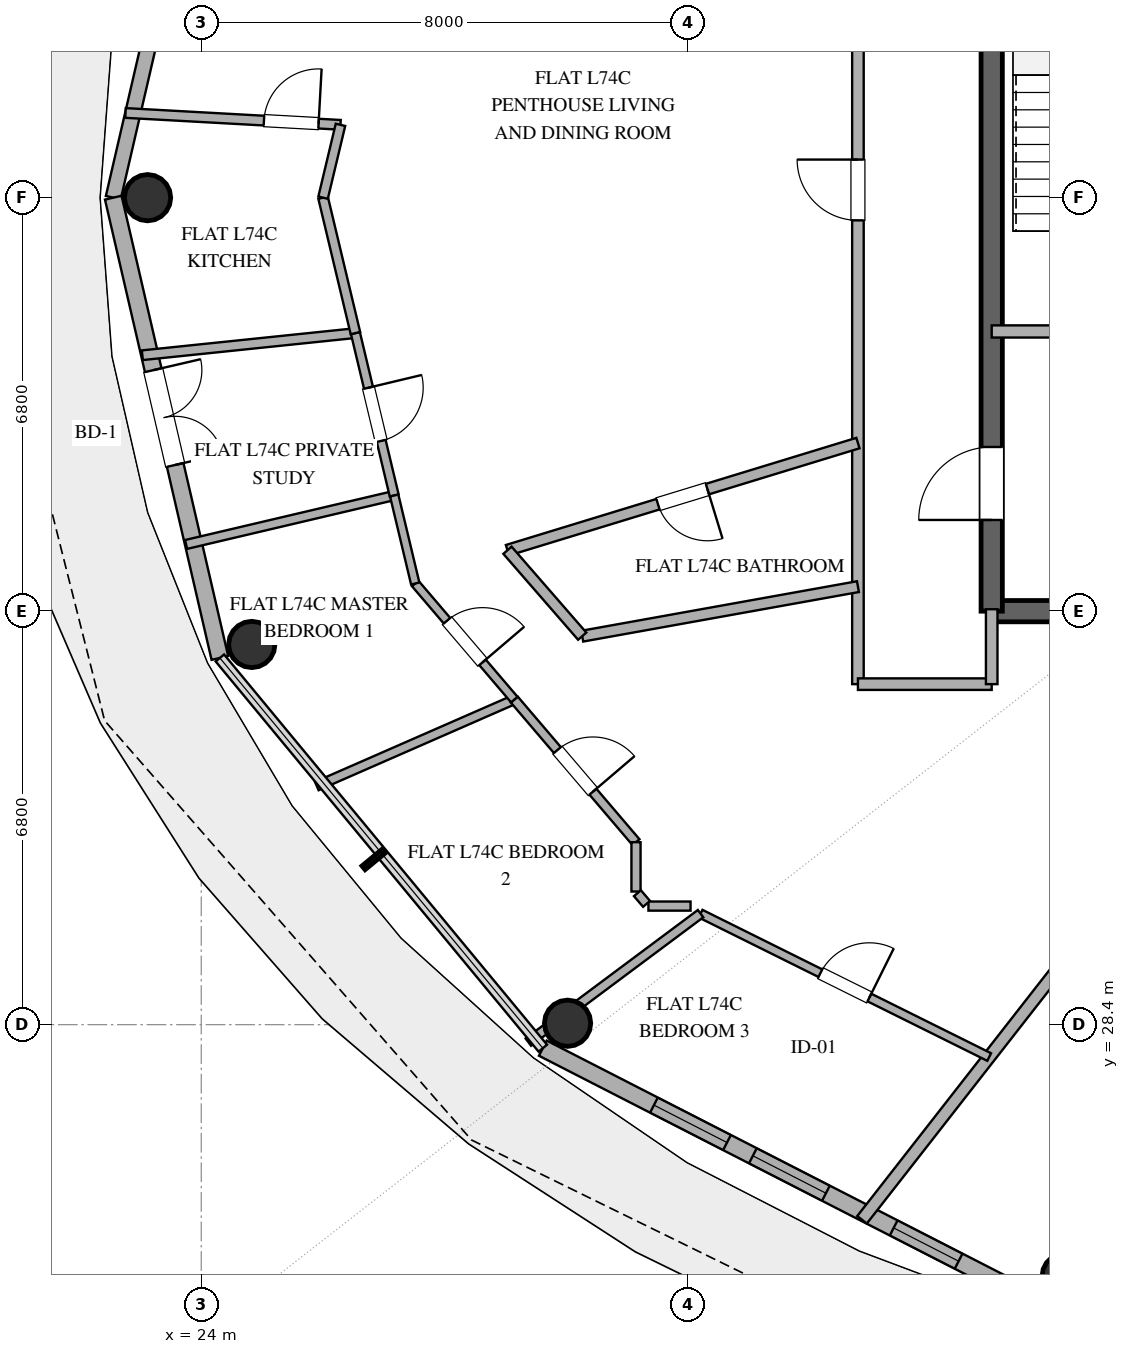
"""IFC4 building model, lengths in metres.
Left out: names, types, materials, properties, quantities, classifications, styles, units other than length and angle.
Written with IfcOpenShell. Run it as: python <this file> out.ifc"""

import sys

from ifc_helpers import new_model, si_unit, direction, frame, frame_2d, origin, origin_2d, place, context, subcontext, project, spatial, rectangle, hollow_circle, extrude, element, fill, save


model = new_model("IFC4")
c1 = context("Model", 3, precision=1e-05, world=origin(), true_north=direction((0.0, 1.0)))
c2 = subcontext(c1, "Body", "Model", "MODEL_VIEW")
j1 = project(units=[si_unit("LENGTHUNIT", "METRE"), si_unit("PLANEANGLEUNIT", "RADIAN")], contexts=[c1])
p1 = place(None, origin())
s1 = spatial("IfcSite", under=j1, at=p1, CompositionType="ELEMENT")
p2 = place(p1, origin())
s2 = spatial("IfcBuilding", under=s1, at=p2, CompositionType="ELEMENT")
p3 = place(p2, frame((0.0, 0.0, 287.4)))
s3 = spatial("IfcBuildingStorey", under=s2, at=p3, CompositionType="ELEMENT", Elevation=287.4)
p4 = place(p3, frame((37.0, 35.2, 0.0), z_axis=(0.0, 0.0, 1.0), x_axis=(1.0, 0.0, 0.0)))
e1 = element("IfcWall", 1, at=p4, inside=s3, PredefinedType="SHEAR", context=c2, shape_type="SweptSolid", body=[
    extrude(rectangle(XDim=4.0, YDim=0.35, at=frame_2d((2.0, 0.0))), origin(), (0.0, 0.0, 1.0), 3.37),
])
p5 = place(p3, frame((37.0, 35.2, 0.0), z_axis=(0.0, 0.0, 1.0), x_axis=(0.0, 1.0, 0.0)))
e2 = element("IfcWall", 2, at=p5, inside=s3, PredefinedType="SHEAR", context=c2, shape_type="SweptSolid", body=[
    extrude(rectangle(XDim=13.6, YDim=0.35, at=frame_2d((6.8, 0.0))), origin(), (0.0, 0.0, 1.0), 3.37),
])
p6 = place(p5, frame((1.5, 0.0, 0.0)))
e3 = element("IfcOpeningElement", 3, at=p6, cuts=e2, PredefinedType="OPENING", context=c2, shape_type="SweptSolid", body=[
    extrude(rectangle(XDim=1.2, YDim=2.15, at=frame_2d((0.6, 1.075))), frame((0.0, 0.185, 0.0), z_axis=(0.0, -1.0, 0.0), x_axis=(1.0, 0.0, 0.0)), (0.0, 0.0, 1.0), 0.37),
])
for number, where, z_axis, x_axis in (
    (4, (23.117, 42.0, 0.0), (0.0, 0.0, 1.0), (1.0, 0.0, 0.0)),
    (5, (24.831, 34.653, 0.0), (0.0, 0.0, 1.0), (1.0, 0.0, 0.0)),
    (6, (30.025, 28.424, 0.0), (0.0, 0.0, 1.0), (1.0, 0.0, 0.0)),
    (7, (38.209, 24.261, 0.0), (0.0, 0.0, 1.0), (1.0, 0.0, 0.0)),
):
    element("IfcColumn", number, at=place(p3, frame(where, z_axis=z_axis, x_axis=x_axis)), inside=s3, PredefinedType="COLUMN", context=c2, shape_type="SweptSolid", body=[
        extrude(hollow_circle(Radius=0.381, WallThickness=0.025, at=origin_2d()), origin(), (0.0, 0.0, 1.0), 3.37),
    ])
p7 = place(p3, frame((24.306, 49.57, 0.0), z_axis=(0.0, 0.0, 1.0), x_axis=(-0.225635078214, -0.974211892495, 0.0)))
e8 = element("IfcWall", 8, at=p7, inside=s3, PredefinedType="SOLIDWALL", context=c2, shape_type="SweptSolid", body=[
    extrude(rectangle(XDim=7.77, YDim=0.25, at=frame_2d((3.885, 0.0))), origin(), (0.0, 0.0, 1.0), 3.37),
])
p8 = place(p7, frame((0.878, 0.0, 1.42)))
e9 = element("IfcOpeningElement", 9, at=p8, cuts=e8, PredefinedType="OPENING", context=c2, shape_type="SweptSolid", body=[
    extrude(rectangle(XDim=1.0, YDim=1.05, at=frame_2d((0.5, 0.525))), frame((0.0, 0.135, 0.0), z_axis=(0.0, -1.0, 0.0), x_axis=(1.0, 0.0, 0.0)), (0.0, 0.0, 1.0), 0.27),
])
p9 = place(p3, frame((22.553, 42.0, 0.0), z_axis=(0.0, 0.0, 1.0), x_axis=(0.225635078214, -0.974211892495, 0.0)))
e10 = element("IfcWall", 10, at=p9, inside=s3, PredefinedType="SOLIDWALL", context=c2, shape_type="SweptSolid", body=[
    extrude(rectangle(XDim=7.77, YDim=0.28, at=frame_2d((3.885, 0.0))), origin(), (0.0, 0.0, 1.0), 3.37),
])
p10 = place(p9, frame((2.912, 0.0, 0.0)))
e11 = element("IfcOpeningElement", 11, at=p10, cuts=e10, PredefinedType="OPENING", context=c2, shape_type="SweptSolid", body=[
    extrude(rectangle(XDim=1.6, YDim=2.25, at=frame_2d((0.8, 1.125))), frame((0.0, 0.15, 0.0), z_axis=(0.0, -1.0, 0.0), x_axis=(1.0, 0.0, 0.0)), (0.0, 0.0, 1.0), 0.3),
])
p11 = place(p3, frame((29.617, 28.013, 0.0), z_axis=(0.0, 0.0, 1.0), x_axis=(0.890007394051, -0.455946091699, 0.0)))
e12 = element("IfcWall", 12, at=p11, inside=s3, PredefinedType="SOLIDWALL", context=c2, shape_type="SweptSolid", body=[
    extrude(rectangle(XDim=9.404, YDim=0.28, at=frame_2d((4.702, 0.0))), origin(), (0.0, 0.0, 1.0), 3.37),
])
p12 = place(p11, frame((2.053, 0.0, 0.85)))
e13 = element("IfcOpeningElement", 13, at=p12, cuts=e12, PredefinedType="OPENING", context=c2, shape_type="SweptSolid", body=[
    extrude(rectangle(XDim=1.35, YDim=1.8, at=frame_2d((0.675, 0.9))), frame((0.0, 0.15, 0.0), z_axis=(0.0, -1.0, 0.0), x_axis=(1.0, 0.0, 0.0)), (0.0, 0.0, 1.0), 0.3),
])
p13 = place(p11, frame((3.881, 0.0, 0.85)))
e14 = element("IfcOpeningElement", 14, at=p13, cuts=e12, PredefinedType="OPENING", context=c2, shape_type="SweptSolid", body=[
    extrude(rectangle(XDim=1.35, YDim=1.8, at=frame_2d((0.675, 0.9))), frame((0.0, 0.15, 0.0), z_axis=(0.0, -1.0, 0.0), x_axis=(1.0, 0.0, 0.0)), (0.0, 0.0, 1.0), 0.3),
])
p14 = place(p11, frame((6.483, 0.0, 0.85)))
e15 = element("IfcOpeningElement", 15, at=p14, cuts=e12, PredefinedType="OPENING", context=c2, shape_type="SweptSolid", body=[
    extrude(rectangle(XDim=1.2, YDim=1.8, at=frame_2d((0.6, 0.9))), frame((0.0, 0.15, 0.0), z_axis=(0.0, -1.0, 0.0), x_axis=(1.0, 0.0, 0.0)), (0.0, 0.0, 1.0), 0.3),
])
p15 = place(p3, frame((37.0, 39.8, 0.0), z_axis=(0.0, 0.0, 1.0), x_axis=(1.0, 0.0, 0.0)))
e16 = element("IfcWall", 16, at=p15, inside=s3, PredefinedType="SOLIDWALL", context=c2, shape_type="SweptSolid", body=[
    extrude(rectangle(XDim=4.0, YDim=0.2, at=frame_2d((2.0, 0.0))), origin(), (0.0, 0.0, 1.0), 2.73),
])
p16 = place(p15, frame((1.45, 0.0, 0.0)))
e17 = element("IfcOpeningElement", 17, at=p16, cuts=e16, PredefinedType="OPENING", context=c2, shape_type="SweptSolid", body=[
    extrude(rectangle(XDim=1.1, YDim=2.15, at=frame_2d((0.55, 1.075))), frame((0.0, 0.11, 0.0), z_axis=(0.0, -1.0, 0.0), x_axis=(1.0, 0.0, 0.0)), (0.0, 0.0, 1.0), 0.22),
])
p17 = place(p3, frame((42.687, 35.2, 0.0), z_axis=(0.0, 0.0, 1.0), x_axis=(-0.615663811723, -0.788008928208, 0.0)))
e18 = element("IfcWall", 18, at=p17, inside=s3, PredefinedType="PARTITIONING", context=c2, shape_type="SweptSolid", body=[
    extrude(rectangle(XDim=12.701, YDim=0.2, at=frame_2d((6.351, 0.0))), origin(), (0.0, 0.0, 1.0), 2.73),
])
p18 = place(p3, frame((34.8, 34.0, 0.0), z_axis=(0.0, 0.0, 1.0), x_axis=(0.0, 1.0, 0.0)))
e19 = element("IfcWall", 19, at=p18, inside=s3, PredefinedType="PARTITIONING", context=c2, shape_type="SweptSolid", body=[
    extrude(rectangle(XDim=16.9, YDim=0.19, at=frame_2d((8.45, 0.0))), origin(), (0.0, 0.0, 1.0), 2.73),
])
p19 = place(p18, frame((7.627, 0.0, 0.0)))
e20 = element("IfcOpeningElement", 20, at=p19, cuts=e19, PredefinedType="OPENING", context=c2, shape_type="SweptSolid", body=[
    extrude(rectangle(XDim=1.0, YDim=2.2, at=frame_2d((0.5, 1.1))), frame((0.0, 0.105, 0.0), z_axis=(0.0, -1.0, 0.0), x_axis=(1.0, 0.0, 0.0)), (0.0, 0.0, 1.0), 0.21),
])
p20 = place(p3, frame((34.8, 37.964, 0.0), z_axis=(0.0, 0.0, 1.0), x_axis=(-0.956308169094, -0.292360540641, 0.0)))
e21 = element("IfcWall", 21, at=p20, inside=s3, PredefinedType="PLUMBINGWALL", context=c2, shape_type="SweptSolid", body=[
    extrude(rectangle(XDim=6.028, YDim=0.18, at=frame_2d((3.014, 0.0))), origin(), (0.0, 0.0, 1.0), 2.73),
])
p21 = place(p20, frame((2.589, 0.0, 0.0)))
e22 = element("IfcOpeningElement", 22, at=p21, cuts=e21, PredefinedType="OPENING", context=c2, shape_type="SweptSolid", body=[
    extrude(rectangle(XDim=0.85, YDim=2.1, at=frame_2d((0.425, 1.05))), frame((0.0, 0.1, 0.0), z_axis=(0.0, -1.0, 0.0), x_axis=(1.0, 0.0, 0.0)), (0.0, 0.0, 1.0), 0.2),
])
p22 = place(p3, frame((32.212, 30.226, 0.0), z_axis=(0.0, 0.0, 1.0), x_axis=(0.895575883974, -0.444908795197, 0.0)))
e23 = element("IfcWall", 23, at=p22, inside=s3, PredefinedType="PARTITIONING", context=c2, shape_type="SweptSolid", body=[
    extrude(rectangle(XDim=5.3, YDim=0.14, at=frame_2d((2.65, 0.0))), origin(), (0.0, 0.0, 1.0), 2.73),
])
p23 = place(p22, frame((2.2, 0.0, 0.0)))
e24 = element("IfcOpeningElement", 24, at=p23, cuts=e23, PredefinedType="OPENING", context=c2, shape_type="SweptSolid", body=[
    extrude(rectangle(XDim=0.9, YDim=2.1, at=frame_2d((0.45, 1.05))), frame((0.0, 0.08, 0.0), z_axis=(0.0, -1.0, 0.0), x_axis=(1.0, 0.0, 0.0)), (0.0, 0.0, 1.0), 0.16),
])
p24 = place(p3, frame((30.265, 34.789, 0.0), z_axis=(0.0, 0.0, 1.0), x_axis=(0.984250881723, 0.176777266148, 0.0)))
e25 = element("IfcWall", 25, at=p24, inside=s3, PredefinedType="PLUMBINGWALL", context=c2, shape_type="SweptSolid", body=[
    extrude(rectangle(XDim=4.607, YDim=0.18, at=frame_2d((2.304, 0.0))), origin(), (0.0, 0.0, 1.0), 2.73),
])
p25 = place(p3, frame((29.148, 33.746, 0.0), z_axis=(0.0, 0.0, 1.0), x_axis=(-0.916054593567, -0.401053589442, 0.0)))
e26 = element("IfcWall", 26, at=p25, inside=s3, PredefinedType="PARTITIONING", context=c2, shape_type="SweptSolid", body=[
    extrude(rectangle(XDim=3.546, YDim=0.15, at=frame_2d((1.773, 0.0))), origin(), (0.0, 0.0, 1.0), 2.73),
])
p26 = place(p3, frame((22.754, 43.393, 0.0), z_axis=(0.0, 0.0, 1.0), x_axis=(0.998481285203, -0.055091951307, 0.0)))
e27 = element("IfcWall", 27, at=p26, inside=s3, PredefinedType="PLUMBINGWALL", context=c2, shape_type="SweptSolid", body=[
    extrude(rectangle(XDim=3.541, YDim=0.16, at=frame_2d((1.771, 0.0))), origin(), (0.0, 0.0, 1.0), 2.73),
])
p27 = place(p26, frame((2.281, 0.0, 0.0)))
e28 = element("IfcOpeningElement", 28, at=p27, cuts=e27, PredefinedType="OPENING", context=c2, shape_type="SweptSolid", body=[
    extrude(rectangle(XDim=0.9, YDim=2.1, at=frame_2d((0.45, 1.05))), frame((0.0, 0.09, 0.0), z_axis=(0.0, -1.0, 0.0), x_axis=(1.0, 0.0, 0.0)), (0.0, 0.0, 1.0), 0.18),
])
p28 = place(p3, frame((32.212, 30.226, 0.0), z_axis=(0.0, 0.0, 1.0), x_axis=(-0.801630280955, -0.597820117306, 0.0)))
e29 = element("IfcWall", 29, at=p28, inside=s3, PredefinedType="PARTITIONING", context=c2, shape_type="SweptSolid", body=[
    extrude(rectangle(XDim=3.534, YDim=0.15, at=frame_2d((1.767, 0.0))), origin(), (0.0, 0.0, 1.0), 2.73),
])
p29 = place(p3, frame((26.536, 39.773, 0.0), z_axis=(0.0, 0.0, 1.0), x_axis=(-0.994663387729, -0.103173374039, 0.0)))
e30 = element("IfcWall", 30, at=p29, inside=s3, PredefinedType="PLUMBINGWALL", context=c2, shape_type="SweptSolid", body=[
    extrude(rectangle(XDim=3.523, YDim=0.16, at=frame_2d((1.762, 0.0))), origin(), (0.0, 0.0, 1.0), 2.73),
])
p30 = place(p3, frame((27.174, 37.102, 0.0), z_axis=(0.0, 0.0, 1.0), x_axis=(-0.973445389286, -0.228919361518, 0.0)))
e31 = element("IfcWall", 31, at=p30, inside=s3, PredefinedType="PARTITIONING", context=c2, shape_type="SweptSolid", body=[
    extrude(rectangle(XDim=3.516, YDim=0.15, at=frame_2d((1.758, 0.0))), origin(), (0.0, 0.0, 1.0), 2.73),
])
p31 = place(p3, frame((29.148, 33.746, 0.0), z_axis=(0.0, 0.0, 1.0), x_axis=(0.649198693287, -0.760618864238, 0.0)))
e32 = element("IfcWall", 32, at=p31, inside=s3, PredefinedType="PARTITIONING", context=c2, shape_type="SweptSolid", body=[
    extrude(rectangle(XDim=3.083, YDim=0.15, at=frame_2d((1.542, 0.0))), origin(), (0.0, 0.0, 1.0), 2.73),
])
p32 = place(p31, frame((1.092, 0.0, 0.0)))
e33 = element("IfcOpeningElement", 33, at=p32, cuts=e32, PredefinedType="OPENING", context=c2, shape_type="SweptSolid", body=[
    extrude(rectangle(XDim=0.9, YDim=2.1, at=frame_2d((0.45, 1.05))), frame((0.0, 0.085, 0.0), z_axis=(0.0, -1.0, 0.0), x_axis=(1.0, 0.0, 0.0)), (0.0, 0.0, 1.0), 0.17),
])
p33 = place(p3, frame((26.536, 39.773, 0.0), z_axis=(0.0, 0.0, 1.0), x_axis=(0.232333689401, -0.97263613791, 0.0)))
e34 = element("IfcWall", 34, at=p33, inside=s3, PredefinedType="PARTITIONING", context=c2, shape_type="SweptSolid", body=[
    extrude(rectangle(XDim=2.746, YDim=0.15, at=frame_2d((1.373, 0.0))), origin(), (0.0, 0.0, 1.0), 2.73),
])
p34 = place(p33, frame((0.923, 0.0, 0.0)))
e35 = element("IfcOpeningElement", 35, at=p34, cuts=e34, PredefinedType="OPENING", context=c2, shape_type="SweptSolid", body=[
    extrude(rectangle(XDim=0.9, YDim=2.1, at=frame_2d((0.45, 1.05))), frame((0.0, 0.085, 0.0), z_axis=(0.0, -1.0, 0.0), x_axis=(1.0, 0.0, 0.0)), (0.0, 0.0, 1.0), 0.17),
])
p35 = place(p3, frame((27.519, 35.655, 0.0), z_axis=(0.0, 0.0, 1.0), x_axis=(0.649219833228, -0.760600820499, 0.0)))
e36 = element("IfcWall", 36, at=p35, inside=s3, PredefinedType="PARTITIONING", context=c2, shape_type="SweptSolid", body=[
    extrude(rectangle(XDim=2.51, YDim=0.14, at=frame_2d((1.255, 0.0))), origin(), (0.0, 0.0, 1.0), 2.73),
])
p36 = place(p35, frame((0.805, 0.0, 0.0)))
e37 = element("IfcOpeningElement", 37, at=p36, cuts=e36, PredefinedType="OPENING", context=c2, shape_type="SweptSolid", body=[
    extrude(rectangle(XDim=0.9, YDim=2.1, at=frame_2d((0.45, 1.05))), frame((0.0, 0.08, 0.0), z_axis=(0.0, -1.0, 0.0), x_axis=(1.0, 0.0, 0.0)), (0.0, 0.0, 1.0), 0.16),
])
p37 = place(p3, frame((26.004, 42.0, 0.0), z_axis=(0.0, 0.0, 1.0), x_axis=(0.232312317028, -0.972641242883, 0.0)))
e38 = element("IfcWall", 38, at=p37, inside=s3, PredefinedType="PLUMBINGWALL", context=c2, shape_type="SweptSolid", body=[
    extrude(rectangle(XDim=2.29, YDim=0.16, at=frame_2d((1.145, 0.0))), origin(), (0.0, 0.0, 1.0), 2.73),
])
p38 = place(p3, frame((37.0, 34.0, 0.0), z_axis=(0.0, 0.0, 1.0), x_axis=(-1.0, 0.0, 0.0)))
e39 = element("IfcWall", 39, at=p38, inside=s3, PredefinedType="PARTITIONING", context=c2, shape_type="SweptSolid", body=[
    extrude(rectangle(XDim=2.2, YDim=0.19, at=frame_2d((1.1, 0.0))), origin(), (0.0, 0.0, 1.0), 2.73),
])
p39 = place(p3, frame((29.036, 36.202, 0.0), z_axis=(0.0, 0.0, 1.0), x_axis=(0.656333580006, -0.754470828963, 0.0)))
e40 = element("IfcWall", 40, at=p39, inside=s3, PredefinedType="PLUMBINGWALL", context=c2, shape_type="SweptSolid", body=[
    extrude(rectangle(XDim=1.873, YDim=0.18, at=frame_2d((0.937, 0.0))), origin(), (0.0, 0.0, 1.0), 2.73),
])
p40 = place(p3, frame((27.174, 37.102, 0.0), z_axis=(0.0, 0.0, 1.0), x_axis=(0.232212116671, -0.972665169969, 0.0)))
e41 = element("IfcWall", 41, at=p40, inside=s3, PredefinedType="PARTITIONING", context=c2, shape_type="SweptSolid", body=[
    extrude(rectangle(XDim=1.488, YDim=0.14, at=frame_2d((0.744, 0.0))), origin(), (0.0, 0.0, 1.0), 2.73),
])
p41 = place(p3, frame((37.0, 35.232, 0.0), z_axis=(0.0, 0.0, 1.0), x_axis=(0.0, -1.0, 0.0)))
e42 = element("IfcWall", 42, at=p41, inside=s3, PredefinedType="PARTITIONING", context=c2, shape_type="SweptSolid", body=[
    extrude(rectangle(XDim=1.232, YDim=0.19, at=frame_2d((0.616, 0.0))), origin(), (0.0, 0.0, 1.0), 2.73),
])
p42 = place(p3, frame((26.29, 43.198, 0.0), z_axis=(0.0, 0.0, 1.0), x_axis=(-0.232308267809, -0.972642210017, 0.0)))
e43 = element("IfcWall", 43, at=p42, inside=s3, PredefinedType="PLUMBINGWALL", context=c2, shape_type="SweptSolid", body=[
    extrude(rectangle(XDim=1.232, YDim=0.16, at=frame_2d((0.616, 0.0))), origin(), (0.0, 0.0, 1.0), 2.73),
])
p43 = place(p3, frame((31.15, 31.401, 0.0), z_axis=(0.0, 0.0, 1.0), x_axis=(0.0, -1.0, 0.0)))
e44 = element("IfcWall", 44, at=p43, inside=s3, PredefinedType="PARTITIONING", context=c2, shape_type="SweptSolid", body=[
    extrude(rectangle(XDim=0.812, YDim=0.15, at=frame_2d((0.406, 0.0))), origin(), (0.0, 0.0, 1.0), 2.73),
])
p44 = place(p3, frame((31.354, 30.35, 0.0), z_axis=(0.0, 0.0, 1.0), x_axis=(1.0, 0.0, 0.0)))
e45 = element("IfcWall", 45, at=p44, inside=s3, PredefinedType="PARTITIONING", context=c2, shape_type="SweptSolid", body=[
    extrude(rectangle(XDim=0.693, YDim=0.15, at=frame_2d((0.346, 0.0))), origin(), (0.0, 0.0, 1.0), 2.73),
])
p45 = place(p3, frame((31.173, 30.562, 0.0), z_axis=(0.0, 0.0, 1.0), x_axis=(0.648874632887, -0.760895334981, 0.0)))
e46 = element("IfcWall", 46, at=p45, inside=s3, PredefinedType="PARTITIONING", context=c2, shape_type="SweptSolid", body=[
    extrude(rectangle(XDim=0.231, YDim=0.15, at=frame_2d((0.115, 0.0))), origin(), (0.0, 0.0, 1.0), 2.73),
])
p46 = place(p10, origin())
e47 = element("IfcDoor", 47, at=p46, inside=s3, OperationType="DOUBLE_DOOR_SINGLE_SWING", PredefinedType="DOOR", context=c2, shape_type="SweptSolid", body=[
    extrude(rectangle(XDim=1.6, YDim=2.25, at=frame_2d((0.8, 1.125))), frame((0.0, 0.025, 0.0), z_axis=(0.0, -1.0, 0.0), x_axis=(1.0, 0.0, 0.0)), (0.0, 0.0, 1.0), 0.05),
])
fill(e11, e47)
p47 = place(p12, origin())
e48 = element("IfcWindow", 48, at=p47, inside=s3, PartitioningType="SINGLE_PANEL", PredefinedType="WINDOW", context=c2, shape_type="SweptSolid", body=[
    extrude(rectangle(XDim=1.35, YDim=1.8, at=frame_2d((0.675, 0.9))), frame((0.0, 0.03, 0.0), z_axis=(0.0, -1.0, 0.0), x_axis=(1.0, 0.0, 0.0)), (0.0, 0.0, 1.0), 0.06),
])
fill(e13, e48)
p48 = place(p13, origin())
e49 = element("IfcWindow", 49, at=p48, inside=s3, PartitioningType="SINGLE_PANEL", PredefinedType="WINDOW", context=c2, shape_type="SweptSolid", body=[
    extrude(rectangle(XDim=1.35, YDim=1.8, at=frame_2d((0.675, 0.9))), frame((0.0, 0.03, 0.0), z_axis=(0.0, -1.0, 0.0), x_axis=(1.0, 0.0, 0.0)), (0.0, 0.0, 1.0), 0.06),
])
fill(e14, e49)
p49 = place(p14, origin())
e50 = element("IfcWindow", 50, at=p49, inside=s3, PartitioningType="SINGLE_PANEL", PredefinedType="WINDOW", context=c2, shape_type="SweptSolid", body=[
    extrude(rectangle(XDim=1.2, YDim=1.8, at=frame_2d((0.6, 0.9))), frame((0.0, 0.03, 0.0), z_axis=(0.0, -1.0, 0.0), x_axis=(1.0, 0.0, 0.0)), (0.0, 0.0, 1.0), 0.06),
])
fill(e15, e50)
p50 = place(p6, origin())
e51 = element("IfcDoor", 51, at=p50, inside=s3, OperationType="SINGLE_SWING_LEFT", PredefinedType="DOOR", context=c2, shape_type="SweptSolid", body=[
    extrude(rectangle(XDim=1.2, YDim=2.15, at=frame_2d((0.6, 1.075))), frame((0.0, 0.025, 0.0), z_axis=(0.0, -1.0, 0.0), x_axis=(1.0, 0.0, 0.0)), (0.0, 0.0, 1.0), 0.05),
])
fill(e3, e51)
p51 = place(p19, origin())
e52 = element("IfcDoor", 52, at=p51, inside=s3, OperationType="SINGLE_SWING_RIGHT", PredefinedType="DOOR", context=c2, shape_type="SweptSolid", body=[
    extrude(rectangle(XDim=1.0, YDim=2.2, at=frame_2d((0.5, 1.1))), frame((0.0, 0.025, 0.0), z_axis=(0.0, -1.0, 0.0), x_axis=(1.0, 0.0, 0.0)), (0.0, 0.0, 1.0), 0.05),
])
fill(e20, e52)
p52 = place(p21, origin())
e53 = element("IfcDoor", 53, at=p52, inside=s3, OperationType="SINGLE_SWING_LEFT", PredefinedType="DOOR", context=c2, shape_type="SweptSolid", body=[
    extrude(rectangle(XDim=0.85, YDim=2.1, at=frame_2d((0.425, 1.05))), frame((0.0, 0.025, 0.0), z_axis=(0.0, -1.0, 0.0), x_axis=(1.0, 0.0, 0.0)), (0.0, 0.0, 1.0), 0.05),
])
fill(e22, e53)
p53 = place(p23, origin())
e54 = element("IfcDoor", 54, at=p53, inside=s3, OperationType="SINGLE_SWING_RIGHT", PredefinedType="DOOR", context=c2, shape_type="SweptSolid", body=[
    extrude(rectangle(XDim=0.9, YDim=2.1, at=frame_2d((0.45, 1.05))), frame((0.0, 0.025, 0.0), z_axis=(0.0, -1.0, 0.0), x_axis=(1.0, 0.0, 0.0)), (0.0, 0.0, 1.0), 0.05),
])
fill(e24, e54)
p54 = place(p27, origin())
e55 = element("IfcDoor", 55, at=p54, inside=s3, OperationType="SINGLE_SWING_RIGHT", PredefinedType="DOOR", context=c2, shape_type="SweptSolid", body=[
    extrude(rectangle(XDim=0.9, YDim=2.1, at=frame_2d((0.45, 1.05))), frame((0.0, 0.025, 0.0), z_axis=(0.0, -1.0, 0.0), x_axis=(1.0, 0.0, 0.0)), (0.0, 0.0, 1.0), 0.05),
])
fill(e28, e55)
p55 = place(p32, origin())
e56 = element("IfcDoor", 56, at=p55, inside=s3, OperationType="SINGLE_SWING_RIGHT", PredefinedType="DOOR", context=c2, shape_type="SweptSolid", body=[
    extrude(rectangle(XDim=0.9, YDim=2.1, at=frame_2d((0.45, 1.05))), frame((0.0, 0.025, 0.0), z_axis=(0.0, -1.0, 0.0), x_axis=(1.0, 0.0, 0.0)), (0.0, 0.0, 1.0), 0.05),
])
fill(e33, e56)
p56 = place(p34, origin())
e57 = element("IfcDoor", 57, at=p56, inside=s3, OperationType="SINGLE_SWING_LEFT", PredefinedType="DOOR", context=c2, shape_type="SweptSolid", body=[
    extrude(rectangle(XDim=0.9, YDim=2.1, at=frame_2d((0.45, 1.05))), frame((0.0, 0.025, 0.0), z_axis=(0.0, -1.0, 0.0), x_axis=(1.0, 0.0, 0.0)), (0.0, 0.0, 1.0), 0.05),
])
fill(e35, e57)
p57 = place(p36, origin())
e58 = element("IfcDoor", 58, at=p57, inside=s3, OperationType="SINGLE_SWING_RIGHT", PredefinedType="DOOR", context=c2, shape_type="SweptSolid", body=[
    extrude(rectangle(XDim=0.9, YDim=2.1, at=frame_2d((0.45, 1.05))), frame((0.0, 0.025, 0.0), z_axis=(0.0, -1.0, 0.0), x_axis=(1.0, 0.0, 0.0)), (0.0, 0.0, 1.0), 0.05),
])
fill(e37, e58)
save(model, sys.argv[1])
